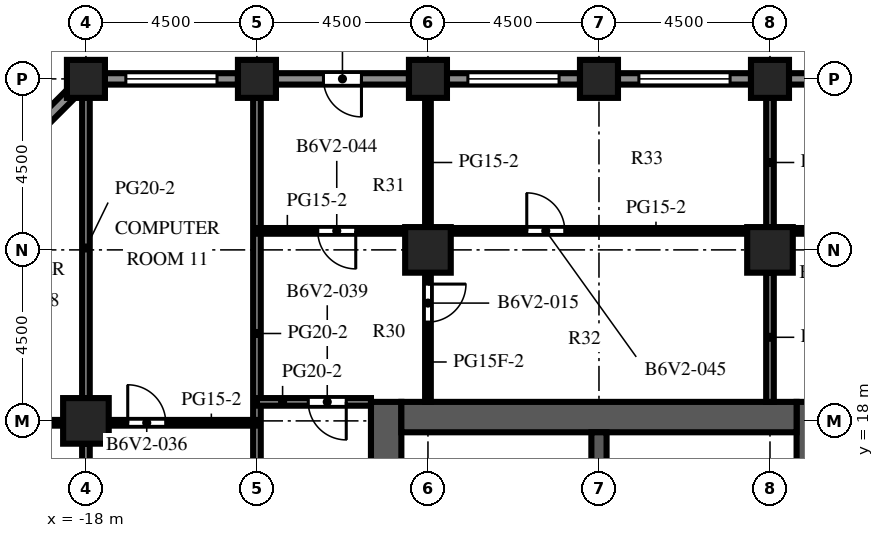
"""IFC4 building model, lengths in metres.
Left out: names, types, materials, properties, quantities, classifications, styles, units other than length and angle.
Written with IfcOpenShell. Run it as: python <this file> out.ifc"""

import sys

from ifc_helpers import new_model, si_unit, direction, frame, frame_2d, origin, origin_2d, place, context, subcontext, project, spatial, rectangle, extrude, element, fill, save


model = new_model("IFC4")
c1 = context("Model", 3, precision=1e-05, world=origin(), true_north=direction((0.0, 1.0)))
c2 = subcontext(c1, "Body", "Model", "MODEL_VIEW")
j1 = project(units=[si_unit("LENGTHUNIT", "METRE"), si_unit("PLANEANGLEUNIT", "RADIAN")], contexts=[c1])
p1 = place(None, origin())
s1 = spatial("IfcSite", under=j1, at=p1, CompositionType="ELEMENT")
p2 = place(p1, origin())
s2 = spatial("IfcBuilding", under=s1, at=p2, CompositionType="ELEMENT")
p3 = place(p2, frame((0.0, 0.0, 216.1)))
s3 = spatial("IfcBuildingStorey", under=s2, at=p3, CompositionType="ELEMENT", Elevation=216.1)
for number, where, z_axis, x_axis in (
    (1, (-18.0, 27.0, 0.0), (0.0, 0.0, 1.0), (1.0, 0.0, 0.0)),
    (2, (-13.5, 27.0, 0.0), (0.0, 0.0, 1.0), (1.0, 0.0, 0.0)),
    (3, (-9.0, 27.0, 0.0), (0.0, 0.0, 1.0), (1.0, 0.0, 0.0)),
    (4, (-4.5, 27.0, 0.0), (0.0, 0.0, 1.0), (1.0, 0.0, 0.0)),
    (5, (0.0, 27.0, 0.0), (0.0, 0.0, 1.0), (1.0, 0.0, 0.0)),
):
    element("IfcColumn", number, at=place(p3, frame(where, z_axis=z_axis, x_axis=x_axis)), inside=s3, PredefinedType="COLUMN", context=c2, shape_type="SweptSolid", body=[
        extrude(rectangle(XDim=1.0, YDim=1.0, at=origin_2d()), origin(), (0.0, 0.0, 1.0), 4.1),
    ])
for number, where, z_axis, x_axis in (
    (6, (-18.0, 18.0, 0.0), (0.0, 0.0, 1.0), (1.0, 0.0, 0.0)),
    (7, (-9.0, 22.5, 0.0), (0.0, 0.0, 1.0), (1.0, 0.0, 0.0)),
    (8, (0.0, 22.5, 0.0), (0.0, 0.0, 1.0), (1.0, 0.0, 0.0)),
):
    element("IfcColumn", number, at=place(p3, frame(where, z_axis=z_axis, x_axis=x_axis)), inside=s3, PredefinedType="COLUMN", context=c2, shape_type="SweptSolid", body=[
        extrude(rectangle(XDim=1.2, YDim=1.2, at=origin_2d()), origin(), (0.0, 0.0, 1.0), 4.1),
    ])
p4 = place(p3, frame((-10.1, -9.0, 0.0), z_axis=(0.0, 0.0, 1.0), x_axis=(0.0, 1.0, 0.0)))
e9 = element("IfcWall", 9, at=p4, inside=s3, PredefinedType="SHEAR", context=c2, shape_type="SweptSolid", body=[
    extrude(rectangle(XDim=27.5, YDim=0.8, at=frame_2d((13.75, 0.0))), origin(), (0.0, 0.0, 1.0), 4.1),
])
p5 = place(p4, frame((12.55, 0.0, 0.0)))
e10 = element("IfcOpeningElement", 10, at=p5, cuts=e9, PredefinedType="OPENING", context=c2, shape_type="SweptSolid", body=[
    extrude(rectangle(XDim=2.4, YDim=2.4, at=frame_2d((1.2, 1.2))), frame((0.0, 0.41, 0.0), z_axis=(0.0, -1.0, 0.0), x_axis=(1.0, 0.0, 0.0)), (0.0, 0.0, 1.0), 0.82),
])
p6 = place(p4, frame((6.825, 0.0, 0.0)))
e11 = element("IfcOpeningElement", 11, at=p6, cuts=e9, PredefinedType="OPENING", context=c2, shape_type="SweptSolid", body=[
    extrude(rectangle(XDim=1.2, YDim=2.1, at=frame_2d((0.6, 1.05))), frame((0.0, 0.41, 0.0), z_axis=(0.0, -1.0, 0.0), x_axis=(1.0, 0.0, 0.0)), (0.0, 0.0, 1.0), 0.82),
])
p7 = place(p4, frame((19.475, 0.0, 0.0)))
e12 = element("IfcOpeningElement", 12, at=p7, cuts=e9, PredefinedType="OPENING", context=c2, shape_type="SweptSolid", body=[
    extrude(rectangle(XDim=1.2, YDim=2.1, at=frame_2d((0.6, 1.05))), frame((0.0, 0.41, 0.0), z_axis=(0.0, -1.0, 0.0), x_axis=(1.0, 0.0, 0.0)), (0.0, 0.0, 1.0), 0.82),
])
p8 = place(p3, frame((1.1, -9.0, 0.0), z_axis=(0.0, 0.0, 1.0), x_axis=(0.0, 1.0, 0.0)))
e13 = element("IfcWall", 13, at=p8, inside=s3, PredefinedType="SHEAR", context=c2, shape_type="SweptSolid", body=[
    extrude(rectangle(XDim=27.5, YDim=0.8, at=frame_2d((13.75, 0.0))), origin(), (0.0, 0.0, 1.0), 4.1),
])
p9 = place(p8, frame((12.55, 0.0, 0.0)))
e14 = element("IfcOpeningElement", 14, at=p9, cuts=e13, PredefinedType="OPENING", context=c2, shape_type="SweptSolid", body=[
    extrude(rectangle(XDim=2.4, YDim=2.4, at=frame_2d((1.2, 1.2))), frame((0.0, 0.41, 0.0), z_axis=(0.0, -1.0, 0.0), x_axis=(1.0, 0.0, 0.0)), (0.0, 0.0, 1.0), 0.82),
])
p10 = place(p8, frame((5.5, 0.0, 0.0)))
e15 = element("IfcOpeningElement", 15, at=p10, cuts=e13, PredefinedType="OPENING", context=c2, shape_type="SweptSolid", body=[
    extrude(rectangle(XDim=0.95, YDim=2.1, at=frame_2d((0.475, 1.05))), frame((0.0, 0.41, 0.0), z_axis=(0.0, -1.0, 0.0), x_axis=(1.0, 0.0, 0.0)), (0.0, 0.0, 1.0), 0.82),
])
p11 = place(p8, frame((23.475, 0.0, 0.0)))
e16 = element("IfcOpeningElement", 16, at=p11, cuts=e13, PredefinedType="OPENING", context=c2, shape_type="SweptSolid", body=[
    extrude(rectangle(XDim=1.2, YDim=2.1, at=frame_2d((0.6, 1.05))), frame((0.0, 0.41, 0.0), z_axis=(0.0, -1.0, 0.0), x_axis=(1.0, 0.0, 0.0)), (0.0, 0.0, 1.0), 0.82),
])
p12 = place(p3, frame((-9.7, 18.1, 0.0), z_axis=(0.0, 0.0, 1.0), x_axis=(1.0, 0.0, 0.0)))
e17 = element("IfcWall", 17, at=p12, inside=s3, PredefinedType="SHEAR", context=c2, shape_type="SweptSolid", body=[
    extrude(rectangle(XDim=10.4, YDim=0.8, at=frame_2d((5.2, 0.0))), origin(), (0.0, 0.0, 1.0), 4.1),
])
p13 = place(p3, frame((-4.5, 10.2, 0.0), z_axis=(0.0, 0.0, 1.0), x_axis=(0.0, 1.0, 0.0)))
e18 = element("IfcWall", 18, at=p13, inside=s3, PredefinedType="SHEAR", context=c2, shape_type="SweptSolid", body=[
    extrude(rectangle(XDim=7.5, YDim=0.4, at=frame_2d((3.75, 0.0))), origin(), (0.0, 0.0, 1.0), 4.1),
])
p14 = place(p3, frame((0.5, 27.0, 0.0), z_axis=(0.0, 0.0, 1.0), x_axis=(1.0, 0.0, 0.0)))
e19 = element("IfcWall", 19, at=p14, inside=s3, PredefinedType="SOLIDWALL", context=c2, shape_type="SweptSolid", body=[
    extrude(rectangle(XDim=3.5, YDim=0.3, at=frame_2d((1.75, 0.0))), origin(), (0.0, 0.0, 1.0), 2.7),
])
p15 = place(p14, frame((0.55, 0.0, 0.8)))
e20 = element("IfcOpeningElement", 20, at=p15, cuts=e19, PredefinedType="OPENING", context=c2, shape_type="SweptSolid", body=[
    extrude(rectangle(XDim=2.4, YDim=1.7, at=frame_2d((1.2, 0.85))), frame((0.0, 0.16, 0.0), z_axis=(0.0, -1.0, 0.0), x_axis=(1.0, 0.0, 0.0)), (0.0, 0.0, 1.0), 0.32),
])
p16 = place(p3, frame((-4.0, 27.0, 0.0), z_axis=(0.0, 0.0, 1.0), x_axis=(1.0, 0.0, 0.0)))
e21 = element("IfcWall", 21, at=p16, inside=s3, PredefinedType="SOLIDWALL", context=c2, shape_type="SweptSolid", body=[
    extrude(rectangle(XDim=3.5, YDim=0.3, at=frame_2d((1.75, 0.0))), origin(), (0.0, 0.0, 1.0), 2.7),
])
p17 = place(p16, frame((0.55, 0.0, 0.8)))
e22 = element("IfcOpeningElement", 22, at=p17, cuts=e21, PredefinedType="OPENING", context=c2, shape_type="SweptSolid", body=[
    extrude(rectangle(XDim=2.4, YDim=1.7, at=frame_2d((1.2, 0.85))), frame((0.0, 0.16, 0.0), z_axis=(0.0, -1.0, 0.0), x_axis=(1.0, 0.0, 0.0)), (0.0, 0.0, 1.0), 0.32),
])
p18 = place(p3, frame((-8.5, 27.0, 0.0), z_axis=(0.0, 0.0, 1.0), x_axis=(1.0, 0.0, 0.0)))
e23 = element("IfcWall", 23, at=p18, inside=s3, PredefinedType="SOLIDWALL", context=c2, shape_type="SweptSolid", body=[
    extrude(rectangle(XDim=3.5, YDim=0.3, at=frame_2d((1.75, 0.0))), origin(), (0.0, 0.0, 1.0), 2.7),
])
p19 = place(p18, frame((0.55, 0.0, 0.8)))
e24 = element("IfcOpeningElement", 24, at=p19, cuts=e23, PredefinedType="OPENING", context=c2, shape_type="SweptSolid", body=[
    extrude(rectangle(XDim=2.4, YDim=1.7, at=frame_2d((1.2, 0.85))), frame((0.0, 0.16, 0.0), z_axis=(0.0, -1.0, 0.0), x_axis=(1.0, 0.0, 0.0)), (0.0, 0.0, 1.0), 0.32),
])
p20 = place(p3, frame((-13.0, 27.0, 0.0), z_axis=(0.0, 0.0, 1.0), x_axis=(1.0, 0.0, 0.0)))
e25 = element("IfcWall", 25, at=p20, inside=s3, PredefinedType="SOLIDWALL", context=c2, shape_type="SweptSolid", body=[
    extrude(rectangle(XDim=3.5, YDim=0.3, at=frame_2d((1.75, 0.0))), origin(), (0.0, 0.0, 1.0), 2.7),
])
p21 = place(p20, frame((1.25, 0.0, 0.0)))
e26 = element("IfcOpeningElement", 26, at=p21, cuts=e25, PredefinedType="OPENING", context=c2, shape_type="SweptSolid", body=[
    extrude(rectangle(XDim=1.0, YDim=2.2, at=frame_2d((0.5, 1.1))), frame((0.0, 0.16, 0.0), z_axis=(0.0, -1.0, 0.0), x_axis=(1.0, 0.0, 0.0)), (0.0, 0.0, 1.0), 0.32),
])
p22 = place(p3, frame((-17.5, 27.0, 0.0), z_axis=(0.0, 0.0, 1.0), x_axis=(1.0, 0.0, 0.0)))
e27 = element("IfcWall", 27, at=p22, inside=s3, PredefinedType="SOLIDWALL", context=c2, shape_type="SweptSolid", body=[
    extrude(rectangle(XDim=3.5, YDim=0.3, at=frame_2d((1.75, 0.0))), origin(), (0.0, 0.0, 1.0), 2.7),
])
p23 = place(p22, frame((0.55, 0.0, 0.8)))
e28 = element("IfcOpeningElement", 28, at=p23, cuts=e27, PredefinedType="OPENING", context=c2, shape_type="SweptSolid", body=[
    extrude(rectangle(XDim=2.4, YDim=1.7, at=frame_2d((1.2, 0.85))), frame((0.0, 0.16, 0.0), z_axis=(0.0, -1.0, 0.0), x_axis=(1.0, 0.0, 0.0)), (0.0, 0.0, 1.0), 0.32),
])
p24 = place(p3, frame((-22.106, 22.894, 0.0), z_axis=(0.0, 0.0, 1.0), x_axis=(0.707106781187, 0.707106781187, 0.0)))
e29 = element("IfcWall", 29, at=p24, inside=s3, PredefinedType="SOLIDWALL", context=c2, shape_type="SweptSolid", body=[
    extrude(rectangle(XDim=5.25, YDim=0.3, at=frame_2d((2.625, 0.0))), origin(), (0.0, 0.0, 1.0), 2.7),
])
p25 = place(p24, frame((2.025, 0.0, 0.0)))
e30 = element("IfcOpeningElement", 30, at=p25, cuts=e29, PredefinedType="OPENING", context=c2, shape_type="SweptSolid", body=[
    extrude(rectangle(XDim=1.2, YDim=2.2, at=frame_2d((0.6, 1.1))), frame((0.0, 0.16, 0.0), z_axis=(0.0, -1.0, 0.0), x_axis=(1.0, 0.0, 0.0)), (0.0, 0.0, 1.0), 0.32),
])
p26 = place(p3, frame((-0.6, 15.075, 0.0), z_axis=(0.0, 0.0, 1.0), x_axis=(0.0, 1.0, 0.0)))
e31 = element("IfcWall", 31, at=p26, inside=s3, PredefinedType="PARTITIONING", context=c2, shape_type="SweptSolid", body=[
    extrude(rectangle(XDim=2.625, YDim=0.1, at=frame_2d((1.312, 0.0))), origin(), (0.0, 0.0, 1.0), 3.5),
])
p27 = place(p26, frame((0.812, 0.0, 0.0)))
e32 = element("IfcOpeningElement", 32, at=p27, cuts=e31, PredefinedType="OPENING", context=c2, shape_type="SweptSolid", body=[
    extrude(rectangle(XDim=1.0, YDim=2.1, at=frame_2d((0.5, 1.05))), frame((0.0, 0.06, 0.0), z_axis=(0.0, -1.0, 0.0), x_axis=(1.0, 0.0, 0.0)), (0.0, 0.0, 1.0), 0.12),
])
p28 = place(p3, frame((-18.0, 9.6, 0.0), z_axis=(0.0, 0.0, 1.0), x_axis=(0.0, 1.0, 0.0)))
e33 = element("IfcWall", 33, at=p28, inside=s3, PredefinedType="PARTITIONING", context=c2, shape_type="SweptSolid", body=[
    extrude(rectangle(XDim=7.8, YDim=0.2, at=frame_2d((3.9, 0.0))), origin(), (0.0, 0.0, 1.0), 3.5),
])
p29 = place(p3, frame((-18.0, 18.6, 0.0), z_axis=(0.0, 0.0, 1.0), x_axis=(0.0, 1.0, 0.0)))
e34 = element("IfcWall", 34, at=p29, inside=s3, PredefinedType="PARTITIONING", context=c2, shape_type="SweptSolid", body=[
    extrude(rectangle(XDim=7.9, YDim=0.2, at=frame_2d((3.95, 0.0))), origin(), (0.0, 0.0, 1.0), 3.5),
])
p30 = place(p3, frame((-13.5, 6.25, 0.0), z_axis=(0.0, 0.0, 1.0), x_axis=(0.0, 1.0, 0.0)))
e35 = element("IfcWall", 35, at=p30, inside=s3, PredefinedType="PARTITIONING", context=c2, shape_type="SweptSolid", body=[
    extrude(rectangle(XDim=20.25, YDim=0.2, at=frame_2d((10.125, 0.0))), origin(), (0.0, 0.0, 1.0), 3.5),
])
p31 = place(p30, frame((6.85, 0.0, 0.0)))
e36 = element("IfcOpeningElement", 36, at=p31, cuts=e35, PredefinedType="OPENING", context=c2, shape_type="SweptSolid", body=[
    extrude(rectangle(XDim=1.0, YDim=2.1, at=frame_2d((0.5, 1.05))), frame((0.0, 0.11, 0.0), z_axis=(0.0, -1.0, 0.0), x_axis=(1.0, 0.0, 0.0)), (0.0, 0.0, 1.0), 0.22),
])
p32 = place(p3, frame((-9.0, 21.9, 0.0), z_axis=(0.0, 0.0, 1.0), x_axis=(0.0, -1.0, 0.0)))
e37 = element("IfcWall", 37, at=p32, inside=s3, PredefinedType="PARTITIONING", context=c2, shape_type="SweptSolid", body=[
    extrude(rectangle(XDim=3.4, YDim=0.15, at=frame_2d((1.7, 0.0))), origin(), (0.0, 0.0, 1.0), 3.5),
])
p33 = place(p32, frame((0.3, 0.0, 0.0)))
e38 = element("IfcOpeningElement", 38, at=p33, cuts=e37, PredefinedType="OPENING", context=c2, shape_type="SweptSolid", body=[
    extrude(rectangle(XDim=1.0, YDim=2.1, at=frame_2d((0.5, 1.05))), frame((0.0, 0.085, 0.0), z_axis=(0.0, -1.0, 0.0), x_axis=(1.0, 0.0, 0.0)), (0.0, 0.0, 1.0), 0.17),
])
p34 = place(p3, frame((-9.0, 23.1, 0.0), z_axis=(0.0, 0.0, 1.0), x_axis=(0.0, 1.0, 0.0)))
e39 = element("IfcWall", 39, at=p34, inside=s3, PredefinedType="PARTITIONING", context=c2, shape_type="SweptSolid", body=[
    extrude(rectangle(XDim=3.4, YDim=0.15, at=frame_2d((1.7, 0.0))), origin(), (0.0, 0.0, 1.0), 3.5),
])
for number, where, z_axis, x_axis in (
    (40, (0.0, 18.5, 0.0), (0.0, 0.0, 1.0), (0.0, 1.0, 0.0)),
    (41, (0.0, 23.1, 0.0), (0.0, 0.0, 1.0), (0.0, 1.0, 0.0)),
):
    element("IfcWall", number, at=place(p3, frame(where, z_axis=z_axis, x_axis=x_axis)), inside=s3, PredefinedType="PARTITIONING", context=c2, shape_type="SweptSolid", body=[
        extrude(rectangle(XDim=3.4, YDim=0.2, at=frame_2d((1.7, 0.0))), origin(), (0.0, 0.0, 1.0), 3.5),
    ])
p35 = place(p3, frame((-22.0, 17.95, 0.0), z_axis=(0.0, 0.0, 1.0), x_axis=(1.0, 0.0, 0.0)))
e42 = element("IfcWall", 42, at=p35, inside=s3, PredefinedType="PARTITIONING", context=c2, shape_type="SweptSolid", body=[
    extrude(rectangle(XDim=3.4, YDim=0.15, at=frame_2d((1.7, 0.0))), origin(), (0.0, 0.0, 1.0), 3.5),
])
p36 = place(p35, frame((1.35, 0.0, 0.0)))
e43 = element("IfcOpeningElement", 43, at=p36, cuts=e42, PredefinedType="OPENING", context=c2, shape_type="SweptSolid", body=[
    extrude(rectangle(XDim=1.0, YDim=2.1, at=frame_2d((0.5, 1.05))), frame((0.0, 0.085, 0.0), z_axis=(0.0, -1.0, 0.0), x_axis=(1.0, 0.0, 0.0)), (0.0, 0.0, 1.0), 0.17),
])
p37 = place(p3, frame((-17.4, 17.95, 0.0), z_axis=(0.0, 0.0, 1.0), x_axis=(1.0, 0.0, 0.0)))
e44 = element("IfcWall", 44, at=p37, inside=s3, PredefinedType="PARTITIONING", context=c2, shape_type="SweptSolid", body=[
    extrude(rectangle(XDim=3.9, YDim=0.15, at=frame_2d((1.95, 0.0))), origin(), (0.0, 0.0, 1.0), 3.5),
])
p38 = place(p37, frame((0.5, 0.0, 0.0)))
e45 = element("IfcOpeningElement", 45, at=p38, cuts=e44, PredefinedType="OPENING", context=c2, shape_type="SweptSolid", body=[
    extrude(rectangle(XDim=1.0, YDim=2.1, at=frame_2d((0.5, 1.05))), frame((0.0, 0.085, 0.0), z_axis=(0.0, -1.0, 0.0), x_axis=(1.0, 0.0, 0.0)), (0.0, 0.0, 1.0), 0.17),
])
p39 = place(p3, frame((-13.5, 18.5, 0.0), z_axis=(0.0, 0.0, 1.0), x_axis=(1.0, 0.0, 0.0)))
e46 = element("IfcWall", 46, at=p39, inside=s3, PredefinedType="PARTITIONING", context=c2, shape_type="SweptSolid", body=[
    extrude(rectangle(XDim=3.0, YDim=0.2, at=frame_2d((1.5, 0.0))), origin(), (0.0, 0.0, 1.0), 3.5),
])
p40 = place(p39, frame((1.35, 0.0, 0.0)))
e47 = element("IfcOpeningElement", 47, at=p40, cuts=e46, PredefinedType="OPENING", context=c2, shape_type="SweptSolid", body=[
    extrude(rectangle(XDim=1.0, YDim=2.1, at=frame_2d((0.5, 1.05))), frame((0.0, 0.11, 0.0), z_axis=(0.0, -1.0, 0.0), x_axis=(1.0, 0.0, 0.0)), (0.0, 0.0, 1.0), 0.22),
])
p41 = place(p3, frame((-13.5, 23.0, 0.0), z_axis=(0.0, 0.0, 1.0), x_axis=(1.0, 0.0, 0.0)))
e48 = element("IfcWall", 48, at=p41, inside=s3, PredefinedType="PARTITIONING", context=c2, shape_type="SweptSolid", body=[
    extrude(rectangle(XDim=3.9, YDim=0.15, at=frame_2d((1.95, 0.0))), origin(), (0.0, 0.0, 1.0), 3.5),
])
p42 = place(p41, frame((1.6, 0.0, 0.0)))
e49 = element("IfcOpeningElement", 49, at=p42, cuts=e48, PredefinedType="OPENING", context=c2, shape_type="SweptSolid", body=[
    extrude(rectangle(XDim=1.0, YDim=2.1, at=frame_2d((0.5, 1.05))), frame((0.0, 0.085, 0.0), z_axis=(0.0, -1.0, 0.0), x_axis=(1.0, 0.0, 0.0)), (0.0, 0.0, 1.0), 0.17),
])
p43 = place(p3, frame((-8.4, 23.0, 0.0), z_axis=(0.0, 0.0, 1.0), x_axis=(1.0, 0.0, 0.0)))
e50 = element("IfcWall", 50, at=p43, inside=s3, PredefinedType="PARTITIONING", context=c2, shape_type="SweptSolid", body=[
    extrude(rectangle(XDim=7.8, YDim=0.15, at=frame_2d((3.9, 0.0))), origin(), (0.0, 0.0, 1.0), 3.5),
])
p44 = place(p43, frame((2.0, 0.0, 0.0)))
e51 = element("IfcOpeningElement", 51, at=p44, cuts=e50, PredefinedType="OPENING", context=c2, shape_type="SweptSolid", body=[
    extrude(rectangle(XDim=1.0, YDim=2.1, at=frame_2d((0.5, 1.05))), frame((0.0, 0.085, 0.0), z_axis=(0.0, -1.0, 0.0), x_axis=(1.0, 0.0, 0.0)), (0.0, 0.0, 1.0), 0.17),
])
p45 = place(p3, frame((0.6, 23.0, 0.0), z_axis=(0.0, 0.0, 1.0), x_axis=(1.0, 0.0, 0.0)))
e52 = element("IfcWall", 52, at=p45, inside=s3, PredefinedType="PARTITIONING", context=c2, shape_type="SweptSolid", body=[
    extrude(rectangle(XDim=7.8, YDim=0.15, at=frame_2d((3.9, 0.0))), origin(), (0.0, 0.0, 1.0), 3.5),
])
p46 = place(p45, frame((0.75, 0.0, 0.0)))
e53 = element("IfcOpeningElement", 53, at=p46, cuts=e52, PredefinedType="OPENING", context=c2, shape_type="SweptSolid", body=[
    extrude(rectangle(XDim=1.0, YDim=2.1, at=frame_2d((0.5, 1.05))), frame((0.0, 0.085, 0.0), z_axis=(0.0, -1.0, 0.0), x_axis=(1.0, 0.0, 0.0)), (0.0, 0.0, 1.0), 0.17),
])
p47 = place(p17, origin())
e54 = element("IfcWindow", 54, at=p47, inside=s3, PartitioningType="SINGLE_PANEL", PredefinedType="WINDOW", context=c2, shape_type="SweptSolid", body=[
    extrude(rectangle(XDim=2.4, YDim=1.7, at=frame_2d((1.2, 0.85))), frame((0.0, 0.03, 0.0), z_axis=(0.0, -1.0, 0.0), x_axis=(1.0, 0.0, 0.0)), (0.0, 0.0, 1.0), 0.06),
])
fill(e22, e54)
p48 = place(p19, origin())
e55 = element("IfcWindow", 55, at=p48, inside=s3, PartitioningType="SINGLE_PANEL", PredefinedType="WINDOW", context=c2, shape_type="SweptSolid", body=[
    extrude(rectangle(XDim=2.4, YDim=1.7, at=frame_2d((1.2, 0.85))), frame((0.0, 0.03, 0.0), z_axis=(0.0, -1.0, 0.0), x_axis=(1.0, 0.0, 0.0)), (0.0, 0.0, 1.0), 0.06),
])
fill(e24, e55)
p49 = place(p21, origin())
e56 = element("IfcDoor", 56, at=p49, inside=s3, OperationType="SINGLE_SWING_RIGHT", PredefinedType="DOOR", context=c2, shape_type="SweptSolid", body=[
    extrude(rectangle(XDim=1.0, YDim=2.2, at=frame_2d((0.5, 1.1))), frame((0.0, 0.025, 0.0), z_axis=(0.0, -1.0, 0.0), x_axis=(1.0, 0.0, 0.0)), (0.0, 0.0, 1.0), 0.05),
])
fill(e26, e56)
p50 = place(p23, origin())
e57 = element("IfcWindow", 57, at=p50, inside=s3, PartitioningType="SINGLE_PANEL", PredefinedType="WINDOW", context=c2, shape_type="SweptSolid", body=[
    extrude(rectangle(XDim=2.4, YDim=1.7, at=frame_2d((1.2, 0.85))), frame((0.0, 0.03, 0.0), z_axis=(0.0, -1.0, 0.0), x_axis=(1.0, 0.0, 0.0)), (0.0, 0.0, 1.0), 0.06),
])
fill(e28, e57)
p51 = place(p33, origin())
e58 = element("IfcDoor", 58, at=p51, inside=s3, OperationType="SINGLE_SWING_LEFT", PredefinedType="DOOR", context=c2, shape_type="SweptSolid", body=[
    extrude(rectangle(XDim=1.0, YDim=2.1, at=frame_2d((0.5, 1.05))), frame((0.0, 0.025, 0.0), z_axis=(0.0, -1.0, 0.0), x_axis=(1.0, 0.0, 0.0)), (0.0, 0.0, 1.0), 0.05),
])
fill(e38, e58)
p52 = place(p38, origin())
e59 = element("IfcDoor", 59, at=p52, inside=s3, OperationType="SINGLE_SWING_LEFT", PredefinedType="DOOR", context=c2, shape_type="SweptSolid", body=[
    extrude(rectangle(XDim=1.0, YDim=2.1, at=frame_2d((0.5, 1.05))), frame((0.0, 0.025, 0.0), z_axis=(0.0, -1.0, 0.0), x_axis=(1.0, 0.0, 0.0)), (0.0, 0.0, 1.0), 0.05),
])
fill(e45, e59)
p53 = place(p40, origin())
e60 = element("IfcDoor", 60, at=p53, inside=s3, OperationType="SINGLE_SWING_RIGHT", PredefinedType="DOOR", context=c2, shape_type="SweptSolid", body=[
    extrude(rectangle(XDim=1.0, YDim=2.1, at=frame_2d((0.5, 1.05))), frame((0.0, 0.025, 0.0), z_axis=(0.0, -1.0, 0.0), x_axis=(1.0, 0.0, 0.0)), (0.0, 0.0, 1.0), 0.05),
])
fill(e47, e60)
p54 = place(p42, origin())
e61 = element("IfcDoor", 61, at=p54, inside=s3, OperationType="SINGLE_SWING_RIGHT", PredefinedType="DOOR", context=c2, shape_type="SweptSolid", body=[
    extrude(rectangle(XDim=1.0, YDim=2.1, at=frame_2d((0.5, 1.05))), frame((0.0, 0.025, 0.0), z_axis=(0.0, -1.0, 0.0), x_axis=(1.0, 0.0, 0.0)), (0.0, 0.0, 1.0), 0.05),
])
fill(e49, e61)
p55 = place(p44, origin())
e62 = element("IfcDoor", 62, at=p55, inside=s3, OperationType="SINGLE_SWING_LEFT", PredefinedType="DOOR", context=c2, shape_type="SweptSolid", body=[
    extrude(rectangle(XDim=1.0, YDim=2.1, at=frame_2d((0.5, 1.05))), frame((0.0, 0.025, 0.0), z_axis=(0.0, -1.0, 0.0), x_axis=(1.0, 0.0, 0.0)), (0.0, 0.0, 1.0), 0.05),
])
fill(e51, e62)
save(model, sys.argv[1])
